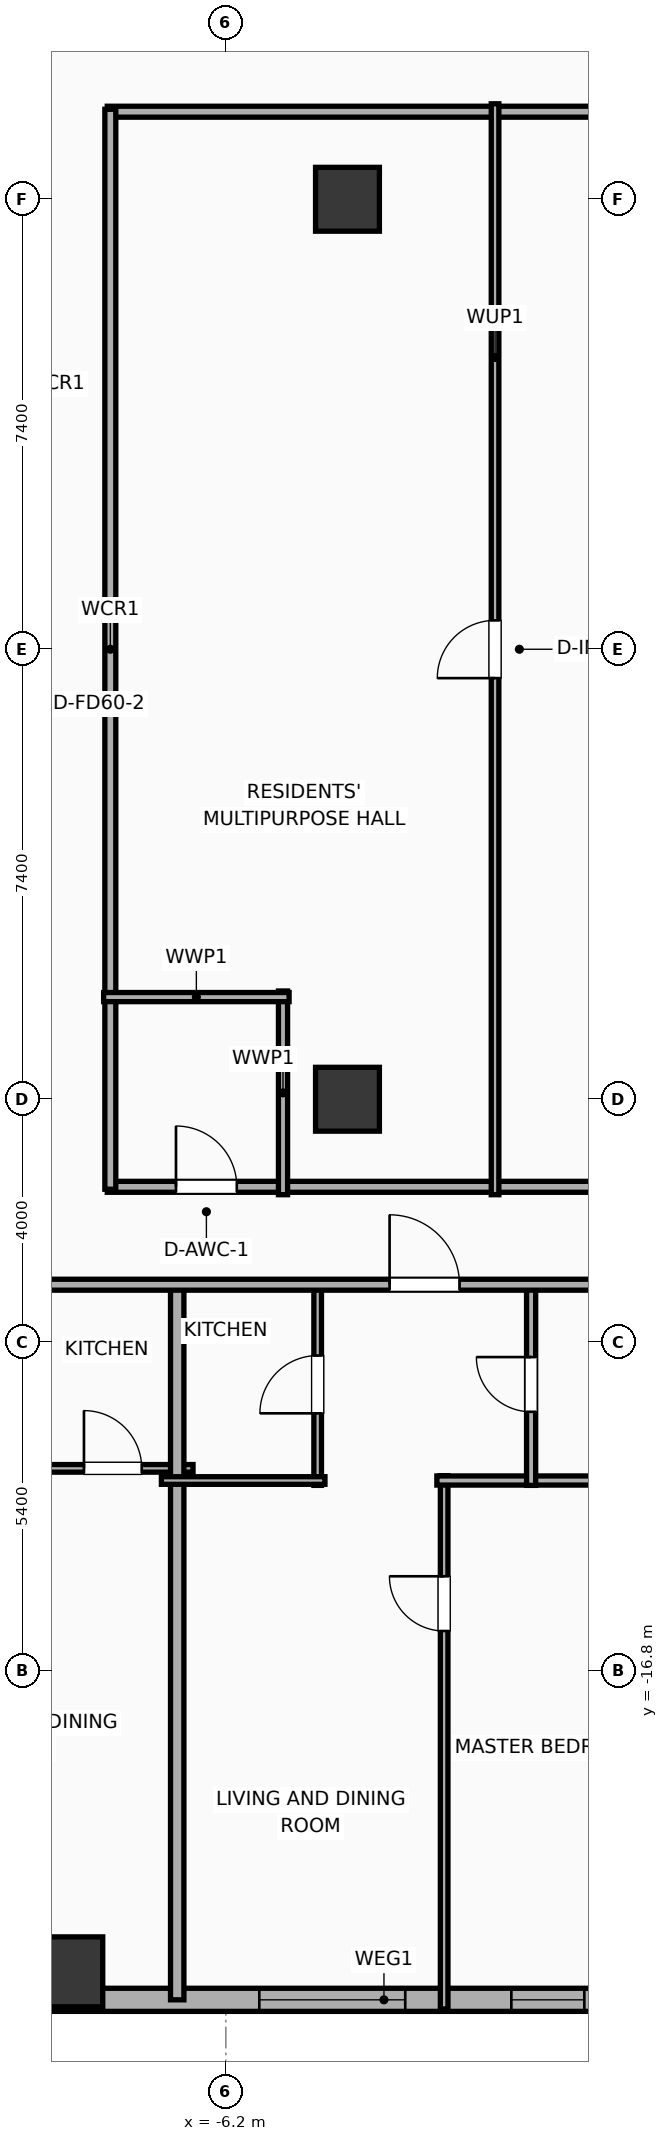
"""IFC4 building model, lengths in metres.
Left out: names, types, materials, properties, quantities, classifications, styles, units other than length and angle.
Written with IfcOpenShell. Run it as: python <this file> out.ifc"""

import sys

from ifc_helpers import new_model, si_unit, direction, frame, frame_2d, origin, origin_2d, place, context, subcontext, project, spatial, rectangle, hollow_rectangle, extrude, element, fill, save


model = new_model("IFC4")
c1 = context("Model", 3, precision=1e-05, world=origin(), true_north=direction((0.0, 1.0)))
c2 = subcontext(c1, "Body", "Model", "MODEL_VIEW")
j1 = project(units=[si_unit("LENGTHUNIT", "METRE"), si_unit("PLANEANGLEUNIT", "RADIAN")], contexts=[c1])
p1 = place(None, origin())
s1 = spatial("IfcSite", under=j1, at=p1, CompositionType="ELEMENT")
p2 = place(p1, origin())
s2 = spatial("IfcBuilding", under=s1, at=p2, CompositionType="ELEMENT")
p3 = place(p2, frame((0.0, 0.0, 57.2)))
s3 = spatial("IfcBuildingStorey", under=s2, at=p3, CompositionType="ELEMENT", Elevation=57.2)
for number, where, z_axis, x_axis in (
    (1, (-4.2, -7.4, 0.0), (0.0, 0.0, 1.0), (1.0, 0.0, 0.0)),
    (2, (-4.2, 7.4, 0.0), (0.0, 0.0, 1.0), (1.0, 0.0, 0.0)),
):
    element("IfcColumn", number, at=place(p3, frame(where, z_axis=z_axis, x_axis=x_axis)), inside=s3, PredefinedType="COLUMN", context=c2, shape_type="SweptSolid", body=[
        extrude(rectangle(XDim=1.05, YDim=1.05, at=origin_2d()), origin(), (0.0, 0.0, 1.0), 3.9),
    ])
p4 = place(p3, frame((-8.8, -21.75, 0.0), z_axis=(0.0, 0.0, 1.0), x_axis=(1.0, 0.0, 0.0)))
e3 = element("IfcColumn", 3, at=p4, inside=s3, PredefinedType="COLUMN", context=c2, shape_type="SweptSolid", body=[
    extrude(hollow_rectangle(XDim=1.15, YDim=1.15, WallThickness=0.04, at=origin_2d()), origin(), (0.0, 0.0, 1.0), 3.9),
])
p5 = place(p3, frame((22.381, -22.21, 0.0), z_axis=(0.0, 0.0, 1.0), x_axis=(-1.0, 0.0, 0.0)))
e4 = element("IfcWall", 4, at=p5, inside=s3, PredefinedType="ELEMENTEDWALL", context=c2, shape_type="SweptSolid", body=[
    extrude(rectangle(XDim=51.963, YDim=0.38, at=frame_2d((25.981, 0.0))), origin(), (0.0, 0.0, 1.0), 3.65),
])
p6 = place(p5, frame((6.61, 0.0, 0.75)))
e5 = element("IfcOpeningElement", 5, at=p6, cuts=e4, PredefinedType="OPENING", context=c2, shape_type="SweptSolid", body=[
    extrude(rectangle(XDim=2.4, YDim=2.1, at=frame_2d((1.2, 1.05))), frame((0.0, 0.2, 0.0), z_axis=(0.0, -1.0, 0.0), x_axis=(1.0, 0.0, 0.0)), (0.0, 0.0, 1.0), 0.4),
])
p7 = place(p5, frame((25.631, 0.0, 0.75)))
e6 = element("IfcOpeningElement", 6, at=p7, cuts=e4, PredefinedType="OPENING", context=c2, shape_type="SweptSolid", body=[
    extrude(rectangle(XDim=2.4, YDim=2.1, at=frame_2d((1.2, 1.05))), frame((0.0, 0.2, 0.0), z_axis=(0.0, -1.0, 0.0), x_axis=(1.0, 0.0, 0.0)), (0.0, 0.0, 1.0), 0.4),
])
p8 = place(p5, frame((49.132, 0.0, 0.75)))
e7 = element("IfcOpeningElement", 7, at=p8, cuts=e4, PredefinedType="OPENING", context=c2, shape_type="SweptSolid", body=[
    extrude(rectangle(XDim=1.2, YDim=2.05, at=frame_2d((0.6, 1.025))), frame((0.0, 0.2, 0.0), z_axis=(0.0, -1.0, 0.0), x_axis=(1.0, 0.0, 0.0)), (0.0, 0.0, 1.0), 0.4),
])
p9 = place(p5, frame((46.086, 0.0, 0.75)))
e8 = element("IfcOpeningElement", 8, at=p9, cuts=e4, PredefinedType="OPENING", context=c2, shape_type="SweptSolid", body=[
    extrude(rectangle(XDim=1.2, YDim=2.05, at=frame_2d((0.6, 1.025))), frame((0.0, 0.2, 0.0), z_axis=(0.0, -1.0, 0.0), x_axis=(1.0, 0.0, 0.0)), (0.0, 0.0, 1.0), 0.4),
])
p10 = place(p5, frame((42.426, 0.0, 0.75)))
e9 = element("IfcOpeningElement", 9, at=p10, cuts=e4, PredefinedType="OPENING", context=c2, shape_type="SweptSolid", body=[
    extrude(rectangle(XDim=1.2, YDim=2.05, at=frame_2d((0.6, 1.025))), frame((0.0, 0.2, 0.0), z_axis=(0.0, -1.0, 0.0), x_axis=(1.0, 0.0, 0.0)), (0.0, 0.0, 1.0), 0.4),
])
p11 = place(p5, frame((38.286, 0.0, 0.75)))
e10 = element("IfcOpeningElement", 10, at=p11, cuts=e4, PredefinedType="OPENING", context=c2, shape_type="SweptSolid", body=[
    extrude(rectangle(XDim=1.2, YDim=2.05, at=frame_2d((0.6, 1.025))), frame((0.0, 0.2, 0.0), z_axis=(0.0, -1.0, 0.0), x_axis=(1.0, 0.0, 0.0)), (0.0, 0.0, 1.0), 0.4),
])
p12 = place(p5, frame((35.219, 0.0, 0.75)))
e11 = element("IfcOpeningElement", 11, at=p12, cuts=e4, PredefinedType="OPENING", context=c2, shape_type="SweptSolid", body=[
    extrude(rectangle(XDim=1.2, YDim=2.05, at=frame_2d((0.6, 1.025))), frame((0.0, 0.2, 0.0), z_axis=(0.0, -1.0, 0.0), x_axis=(1.0, 0.0, 0.0)), (0.0, 0.0, 1.0), 0.4),
])
p13 = place(p5, frame((32.039, 0.0, 0.75)))
e12 = element("IfcOpeningElement", 12, at=p13, cuts=e4, PredefinedType="OPENING", context=c2, shape_type="SweptSolid", body=[
    extrude(rectangle(XDim=1.2, YDim=2.05, at=frame_2d((0.6, 1.025))), frame((0.0, 0.2, 0.0), z_axis=(0.0, -1.0, 0.0), x_axis=(1.0, 0.0, 0.0)), (0.0, 0.0, 1.0), 0.4),
])
p14 = place(p5, frame((22.686, 0.0, 0.75)))
e13 = element("IfcOpeningElement", 13, at=p14, cuts=e4, PredefinedType="OPENING", context=c2, shape_type="SweptSolid", body=[
    extrude(rectangle(XDim=1.2, YDim=2.05, at=frame_2d((0.6, 1.025))), frame((0.0, 0.2, 0.0), z_axis=(0.0, -1.0, 0.0), x_axis=(1.0, 0.0, 0.0)), (0.0, 0.0, 1.0), 0.4),
])
p15 = place(p5, frame((18.786, 0.0, 0.75)))
e14 = element("IfcOpeningElement", 14, at=p15, cuts=e4, PredefinedType="OPENING", context=c2, shape_type="SweptSolid", body=[
    extrude(rectangle(XDim=1.2, YDim=2.05, at=frame_2d((0.6, 1.025))), frame((0.0, 0.2, 0.0), z_axis=(0.0, -1.0, 0.0), x_axis=(1.0, 0.0, 0.0)), (0.0, 0.0, 1.0), 0.4),
])
p16 = place(p5, frame((14.886, 0.0, 0.75)))
e15 = element("IfcOpeningElement", 15, at=p16, cuts=e4, PredefinedType="OPENING", context=c2, shape_type="SweptSolid", body=[
    extrude(rectangle(XDim=1.2, YDim=2.05, at=frame_2d((0.6, 1.025))), frame((0.0, 0.2, 0.0), z_axis=(0.0, -1.0, 0.0), x_axis=(1.0, 0.0, 0.0)), (0.0, 0.0, 1.0), 0.4),
])
p17 = place(p5, frame((11.826, 0.0, 0.75)))
e16 = element("IfcOpeningElement", 16, at=p17, cuts=e4, PredefinedType="OPENING", context=c2, shape_type="SweptSolid", body=[
    extrude(rectangle(XDim=1.2, YDim=2.05, at=frame_2d((0.6, 1.025))), frame((0.0, 0.2, 0.0), z_axis=(0.0, -1.0, 0.0), x_axis=(1.0, 0.0, 0.0)), (0.0, 0.0, 1.0), 0.4),
])
p18 = place(p5, frame((2.836, 0.0, 0.75)))
e17 = element("IfcOpeningElement", 17, at=p18, cuts=e4, PredefinedType="OPENING", context=c2, shape_type="SweptSolid", body=[
    extrude(rectangle(XDim=1.2, YDim=2.05, at=frame_2d((0.6, 1.025))), frame((0.0, 0.2, 0.0), z_axis=(0.0, -1.0, 0.0), x_axis=(1.0, 0.0, 0.0)), (0.0, 0.0, 1.0), 0.4),
])
p19 = place(p3, frame((-8.15, 8.84, 0.0), z_axis=(0.0, 0.0, 1.0), x_axis=(1.0, 0.0, 0.0)))
e18 = element("IfcWall", 18, at=p19, inside=s3, PredefinedType="PARTITIONING", context=c2, shape_type="SweptSolid", body=[
    extrude(rectangle(XDim=16.3, YDim=0.18, at=frame_2d((8.15, 0.0))), origin(), (0.0, 0.0, 1.0), 3.65),
])
p20 = place(p19, frame((8.49, 0.0, 0.0)))
e19 = element("IfcOpeningElement", 19, at=p20, cuts=e18, PredefinedType="OPENING", context=c2, shape_type="SweptSolid", body=[
    extrude(rectangle(XDim=0.95, YDim=2.05, at=frame_2d((0.475, 1.025))), frame((0.0, 0.1, 0.0), z_axis=(0.0, -1.0, 0.0), x_axis=(1.0, 0.0, 0.0)), (0.0, 0.0, 1.0), 0.2),
])
p21 = place(p3, frame((-8.15, -8.84, 0.0), z_axis=(0.0, 0.0, 1.0), x_axis=(1.0, 0.0, 0.0)))
e20 = element("IfcWall", 20, at=p21, inside=s3, PredefinedType="PARTITIONING", context=c2, shape_type="SweptSolid", body=[
    extrude(rectangle(XDim=16.3, YDim=0.18, at=frame_2d((8.15, 0.0))), origin(), (0.0, 0.0, 1.0), 3.65),
])
p22 = place(p21, frame((1.13, 0.0, 0.0)))
e21 = element("IfcOpeningElement", 21, at=p22, cuts=e20, PredefinedType="OPENING", context=c2, shape_type="SweptSolid", body=[
    extrude(rectangle(XDim=1.0, YDim=2.05, at=frame_2d((0.5, 1.025))), frame((0.0, 0.1, 0.0), z_axis=(0.0, -1.0, 0.0), x_axis=(1.0, 0.0, 0.0)), (0.0, 0.0, 1.0), 0.2),
])
p23 = place(p21, frame((10.12, 0.0, 0.0)))
e22 = element("IfcOpeningElement", 22, at=p23, cuts=e20, PredefinedType="OPENING", context=c2, shape_type="SweptSolid", body=[
    extrude(rectangle(XDim=0.95, YDim=2.05, at=frame_2d((0.475, 1.025))), frame((0.0, 0.1, 0.0), z_axis=(0.0, -1.0, 0.0), x_axis=(1.0, 0.0, 0.0)), (0.0, 0.0, 1.0), 0.2),
])
p24 = place(p3, frame((-8.1, -8.88, 0.0), z_axis=(0.0, 0.0, 1.0), x_axis=(0.0, 1.0, 0.0)))
e23 = element("IfcWall", 23, at=p24, inside=s3, PredefinedType="PARTITIONING", context=c2, shape_type="SweptSolid", body=[
    extrude(rectangle(XDim=17.76, YDim=0.18, at=frame_2d((8.88, 0.0))), origin(), (0.0, 0.0, 1.0), 3.65),
])
p25 = place(p3, frame((-5.26, -8.97, 0.0), z_axis=(0.0, 0.0, 1.0), x_axis=(0.0, 1.0, 0.0)))
e24 = element("IfcWall", 24, at=p25, inside=s3, PredefinedType="PLUMBINGWALL", context=c2, shape_type="SweptSolid", body=[
    extrude(rectangle(XDim=3.35, YDim=0.15, at=frame_2d((1.675, 0.0))), origin(), (0.0, 0.0, 1.0), 3.65),
])
p26 = place(p3, frame((-8.21, -5.72, 0.0), z_axis=(0.0, 0.0, 1.0), x_axis=(1.0, 0.0, 0.0)))
e25 = element("IfcWall", 25, at=p26, inside=s3, PredefinedType="PLUMBINGWALL", context=c2, shape_type="SweptSolid", body=[
    extrude(rectangle(XDim=3.05, YDim=0.15, at=frame_2d((1.525, 0.0))), origin(), (0.0, 0.0, 1.0), 3.65),
])
p27 = place(p3, frame((-1.773, -8.97, 0.0), z_axis=(0.0, 0.0, 1.0), x_axis=(0.0, 1.0, 0.0)))
e26 = element("IfcWall", 26, at=p27, inside=s3, PredefinedType="PARTITIONING", context=c2, shape_type="SweptSolid", body=[
    extrude(rectangle(XDim=17.94, YDim=0.125, at=frame_2d((8.97, 0.0))), origin(), (0.0, 0.0, 1.0), 3.65),
])
p28 = place(p27, frame((8.495, 0.0, 0.0)))
e27 = element("IfcOpeningElement", 27, at=p28, cuts=e26, PredefinedType="OPENING", context=c2, shape_type="SweptSolid", body=[
    extrude(rectangle(XDim=0.95, YDim=2.05, at=frame_2d((0.475, 1.025))), frame((0.0, 0.073, 0.0), z_axis=(0.0, -1.0, 0.0), x_axis=(1.0, 0.0, 0.0)), (0.0, 0.0, 1.0), 0.145),
])
p29 = place(p3, frame((-9.377, -13.47, 0.0), z_axis=(0.0, 0.0, 1.0), x_axis=(1.0, 0.0, 0.0)))
e28 = element("IfcWall", 28, at=p29, inside=s3, PredefinedType="PARTITIONING", context=c2, shape_type="SweptSolid", body=[
    extrude(rectangle(XDim=2.637, YDim=0.125, at=frame_2d((1.318, 0.0))), origin(), (0.0, 0.0, 1.0), 3.65),
])
p30 = place(p29, frame((0.844, 0.0, 0.0)))
e29 = element("IfcOpeningElement", 29, at=p30, cuts=e28, PredefinedType="OPENING", context=c2, shape_type="SweptSolid", body=[
    extrude(rectangle(XDim=0.95, YDim=2.05, at=frame_2d((0.475, 1.025))), frame((0.0, 0.073, 0.0), z_axis=(0.0, -1.0, 0.0), x_axis=(1.0, 0.0, 0.0)), (0.0, 0.0, 1.0), 0.145),
])
p31 = place(p3, frame((-7.0, -22.21, 0.0), z_axis=(0.0, 0.0, 1.0), x_axis=(0.0, 1.0, 0.0)))
e30 = element("IfcWall", 30, at=p31, inside=s3, PredefinedType="PARTITIONING", context=c2, shape_type="SweptSolid", body=[
    extrude(rectangle(XDim=11.84, YDim=0.22, at=frame_2d((5.92, 0.0))), origin(), (0.0, 0.0, 1.0), 3.65),
])
p32 = place(p3, frame((-2.61, -22.36, 0.0), z_axis=(0.0, 0.0, 1.0), x_axis=(0.0, 1.0, 0.0)))
e31 = element("IfcWall", 31, at=p32, inside=s3, PredefinedType="PARTITIONING", context=c2, shape_type="SweptSolid", body=[
    extrude(rectangle(XDim=8.77, YDim=0.125, at=frame_2d((4.385, 0.0))), origin(), (0.0, 0.0, 1.0), 3.65),
])
p33 = place(p32, frame((6.215, 0.0, 0.0)))
e32 = element("IfcOpeningElement", 32, at=p33, cuts=e31, PredefinedType="OPENING", context=c2, shape_type="SweptSolid", body=[
    extrude(rectangle(XDim=0.9, YDim=2.05, at=frame_2d((0.45, 1.025))), frame((0.0, 0.073, 0.0), z_axis=(0.0, -1.0, 0.0), x_axis=(1.0, 0.0, 0.0)), (0.0, 0.0, 1.0), 0.145),
])
p34 = place(p3, frame((-2.73, -13.67, 0.0), z_axis=(0.0, 0.0, 1.0), x_axis=(1.0, 0.0, 0.0)))
e33 = element("IfcWall", 33, at=p34, inside=s3, PredefinedType="PLUMBINGWALL", context=c2, shape_type="SweptSolid", body=[
    extrude(rectangle(XDim=3.605, YDim=0.15, at=frame_2d((1.802, 0.0))), origin(), (0.0, 0.0, 1.0), 3.65),
])
p35 = place(p3, frame((-4.69, -13.75, 0.0), z_axis=(0.0, 0.0, 1.0), x_axis=(0.0, 1.0, 0.0)))
e34 = element("IfcWall", 34, at=p35, inside=s3, PredefinedType="PARTITIONING", context=c2, shape_type="SweptSolid", body=[
    extrude(rectangle(XDim=3.32, YDim=0.125, at=frame_2d((1.66, 0.0))), origin(), (0.0, 0.0, 1.0), 3.65),
])
p36 = place(p35, frame((1.185, 0.0, 0.0)))
e35 = element("IfcOpeningElement", 35, at=p36, cuts=e34, PredefinedType="OPENING", context=c2, shape_type="SweptSolid", body=[
    extrude(rectangle(XDim=0.95, YDim=2.05, at=frame_2d((0.475, 1.025))), frame((0.0, 0.073, 0.0), z_axis=(0.0, -1.0, 0.0), x_axis=(1.0, 0.0, 0.0)), (0.0, 0.0, 1.0), 0.145),
])
p37 = place(p3, frame((-7.26, -13.67, 0.0), z_axis=(0.0, 0.0, 1.0), x_axis=(1.0, 0.0, 0.0)))
e36 = element("IfcWall", 36, at=p37, inside=s3, PredefinedType="PARTITIONING", context=c2, shape_type="SweptSolid", body=[
    extrude(rectangle(XDim=2.69, YDim=0.125, at=frame_2d((1.345, 0.0))), origin(), (0.0, 0.0, 1.0), 3.65),
])
p38 = place(p3, frame((-1.18, -13.75, 0.0), z_axis=(0.0, 0.0, 1.0), x_axis=(0.0, 1.0, 0.0)))
e37 = element("IfcWall", 37, at=p38, inside=s3, PredefinedType="PLUMBINGWALL", context=c2, shape_type="SweptSolid", body=[
    extrude(rectangle(XDim=3.32, YDim=0.15, at=frame_2d((1.66, 0.0))), origin(), (0.0, 0.0, 1.0), 3.65),
])
p39 = place(p38, frame((1.21, 0.0, 0.0)))
e38 = element("IfcOpeningElement", 38, at=p39, cuts=e37, PredefinedType="OPENING", context=c2, shape_type="SweptSolid", body=[
    extrude(rectangle(XDim=0.9, YDim=2.05, at=frame_2d((0.45, 1.025))), frame((0.0, 0.085, 0.0), z_axis=(0.0, -1.0, 0.0), x_axis=(1.0, 0.0, 0.0)), (0.0, 0.0, 1.0), 0.17),
])
p40 = place(p3, frame((-33.41, -10.45, 0.0), z_axis=(0.0, 0.0, 1.0), x_axis=(1.0, 0.0, 0.0)))
e39 = element("IfcWall", 39, at=p40, inside=s3, PredefinedType="PARTITIONING", context=c2, shape_type="SweptSolid", body=[
    extrude(rectangle(XDim=59.62, YDim=0.18, at=frame_2d((29.81, 0.0))), origin(), (0.0, 0.0, 1.0), 3.65),
])
p41 = place(p40, frame((5.321, 0.0, 0.0)))
e40 = element("IfcOpeningElement", 40, at=p41, cuts=e39, PredefinedType="OPENING", context=c2, shape_type="SweptSolid", body=[
    extrude(rectangle(XDim=1.15, YDim=2.05, at=frame_2d((0.575, 1.025))), frame((0.0, 0.1, 0.0), z_axis=(0.0, -1.0, 0.0), x_axis=(1.0, 0.0, 0.0)), (0.0, 0.0, 1.0), 0.2),
])
p42 = place(p40, frame((14.3, 0.0, 0.0)))
e41 = element("IfcOpeningElement", 41, at=p42, cuts=e39, PredefinedType="OPENING", context=c2, shape_type="SweptSolid", body=[
    extrude(rectangle(XDim=1.15, YDim=2.05, at=frame_2d((0.575, 1.025))), frame((0.0, 0.1, 0.0), z_axis=(0.0, -1.0, 0.0), x_axis=(1.0, 0.0, 0.0)), (0.0, 0.0, 1.0), 0.2),
])
p43 = place(p40, frame((22.265, 0.0, 0.0)))
e42 = element("IfcOpeningElement", 42, at=p43, cuts=e39, PredefinedType="OPENING", context=c2, shape_type="SweptSolid", body=[
    extrude(rectangle(XDim=0.9, YDim=2.05, at=frame_2d((0.45, 1.025))), frame((0.0, 0.1, 0.0), z_axis=(0.0, -1.0, 0.0), x_axis=(1.0, 0.0, 0.0)), (0.0, 0.0, 1.0), 0.2),
])
p44 = place(p40, frame((29.903, 0.0, 0.0)))
e43 = element("IfcOpeningElement", 43, at=p44, cuts=e39, PredefinedType="OPENING", context=c2, shape_type="SweptSolid", body=[
    extrude(rectangle(XDim=1.15, YDim=2.05, at=frame_2d((0.575, 1.025))), frame((0.0, 0.1, 0.0), z_axis=(0.0, -1.0, 0.0), x_axis=(1.0, 0.0, 0.0)), (0.0, 0.0, 1.0), 0.2),
])
p45 = place(p40, frame((37.701, 0.0, 0.0)))
e44 = element("IfcOpeningElement", 44, at=p45, cuts=e39, PredefinedType="OPENING", context=c2, shape_type="SweptSolid", body=[
    extrude(rectangle(XDim=1.15, YDim=2.05, at=frame_2d((0.575, 1.025))), frame((0.0, 0.1, 0.0), z_axis=(0.0, -1.0, 0.0), x_axis=(1.0, 0.0, 0.0)), (0.0, 0.0, 1.0), 0.2),
])
p46 = place(p40, frame((45.654, 0.0, 0.0)))
e45 = element("IfcOpeningElement", 45, at=p46, cuts=e39, PredefinedType="OPENING", context=c2, shape_type="SweptSolid", body=[
    extrude(rectangle(XDim=0.9, YDim=2.05, at=frame_2d((0.45, 1.025))), frame((0.0, 0.1, 0.0), z_axis=(0.0, -1.0, 0.0), x_axis=(1.0, 0.0, 0.0)), (0.0, 0.0, 1.0), 0.2),
])
p47 = place(p40, frame((54.472, 0.0, 0.0)))
e46 = element("IfcOpeningElement", 46, at=p47, cuts=e39, PredefinedType="OPENING", context=c2, shape_type="SweptSolid", body=[
    extrude(rectangle(XDim=1.15, YDim=2.05, at=frame_2d((0.575, 1.025))), frame((0.0, 0.1, 0.0), z_axis=(0.0, -1.0, 0.0), x_axis=(1.0, 0.0, 0.0)), (0.0, 0.0, 1.0), 0.2),
])
p48 = place(p7, origin())
e47 = element("IfcWindow", 47, at=p48, inside=s3, PartitioningType="SINGLE_PANEL", PredefinedType="WINDOW", context=c2, shape_type="SweptSolid", body=[
    extrude(rectangle(XDim=2.4, YDim=2.1, at=frame_2d((1.2, 1.05))), frame((0.0, 0.03, 0.0), z_axis=(0.0, -1.0, 0.0), x_axis=(1.0, 0.0, 0.0)), (0.0, 0.0, 1.0), 0.06),
])
fill(e6, e47)
p49 = place(p14, origin())
e48 = element("IfcWindow", 48, at=p49, inside=s3, PartitioningType="SINGLE_PANEL", PredefinedType="WINDOW", context=c2, shape_type="SweptSolid", body=[
    extrude(rectangle(XDim=1.2, YDim=2.05, at=frame_2d((0.6, 1.025))), frame((0.0, 0.03, 0.0), z_axis=(0.0, -1.0, 0.0), x_axis=(1.0, 0.0, 0.0)), (0.0, 0.0, 1.0), 0.06),
])
fill(e13, e48)
p50 = place(p22, origin())
e49 = element("IfcDoor", 49, at=p50, inside=s3, OperationType="SINGLE_SWING_LEFT", PredefinedType="DOOR", context=c2, shape_type="SweptSolid", body=[
    extrude(rectangle(XDim=1.0, YDim=2.05, at=frame_2d((0.5, 1.025))), frame((0.0, 0.025, 0.0), z_axis=(0.0, -1.0, 0.0), x_axis=(1.0, 0.0, 0.0)), (0.0, 0.0, 1.0), 0.05),
])
fill(e21, e49)
p51 = place(p28, origin())
e50 = element("IfcDoor", 50, at=p51, inside=s3, OperationType="SINGLE_SWING_LEFT", PredefinedType="DOOR", context=c2, shape_type="SweptSolid", body=[
    extrude(rectangle(XDim=0.95, YDim=2.05, at=frame_2d((0.475, 1.025))), frame((0.0, 0.025, 0.0), z_axis=(0.0, -1.0, 0.0), x_axis=(1.0, 0.0, 0.0)), (0.0, 0.0, 1.0), 0.05),
])
fill(e27, e50)
p52 = place(p30, origin())
e51 = element("IfcDoor", 51, at=p52, inside=s3, OperationType="SINGLE_SWING_LEFT", PredefinedType="DOOR", context=c2, shape_type="SweptSolid", body=[
    extrude(rectangle(XDim=0.95, YDim=2.05, at=frame_2d((0.475, 1.025))), frame((0.0, 0.025, 0.0), z_axis=(0.0, -1.0, 0.0), x_axis=(1.0, 0.0, 0.0)), (0.0, 0.0, 1.0), 0.05),
])
fill(e29, e51)
p53 = place(p33, origin())
e52 = element("IfcDoor", 52, at=p53, inside=s3, OperationType="SINGLE_SWING_RIGHT", PredefinedType="DOOR", context=c2, shape_type="SweptSolid", body=[
    extrude(rectangle(XDim=0.9, YDim=2.05, at=frame_2d((0.45, 1.025))), frame((0.0, 0.025, 0.0), z_axis=(0.0, -1.0, 0.0), x_axis=(1.0, 0.0, 0.0)), (0.0, 0.0, 1.0), 0.05),
])
fill(e32, e52)
p54 = place(p36, origin())
e53 = element("IfcDoor", 53, at=p54, inside=s3, OperationType="SINGLE_SWING_LEFT", PredefinedType="DOOR", context=c2, shape_type="SweptSolid", body=[
    extrude(rectangle(XDim=0.95, YDim=2.05, at=frame_2d((0.475, 1.025))), frame((0.0, 0.025, 0.0), z_axis=(0.0, -1.0, 0.0), x_axis=(1.0, 0.0, 0.0)), (0.0, 0.0, 1.0), 0.05),
])
fill(e35, e53)
p55 = place(p39, origin())
e54 = element("IfcDoor", 54, at=p55, inside=s3, OperationType="SINGLE_SWING_RIGHT", PredefinedType="DOOR", context=c2, shape_type="SweptSolid", body=[
    extrude(rectangle(XDim=0.9, YDim=2.05, at=frame_2d((0.45, 1.025))), frame((0.0, 0.025, 0.0), z_axis=(0.0, -1.0, 0.0), x_axis=(1.0, 0.0, 0.0)), (0.0, 0.0, 1.0), 0.05),
])
fill(e38, e54)
p56 = place(p44, origin())
e55 = element("IfcDoor", 55, at=p56, inside=s3, OperationType="SINGLE_SWING_LEFT", PredefinedType="DOOR", context=c2, shape_type="SweptSolid", body=[
    extrude(rectangle(XDim=1.15, YDim=2.05, at=frame_2d((0.575, 1.025))), frame((0.0, 0.025, 0.0), z_axis=(0.0, -1.0, 0.0), x_axis=(1.0, 0.0, 0.0)), (0.0, 0.0, 1.0), 0.05),
])
fill(e43, e55)
save(model, sys.argv[1])
